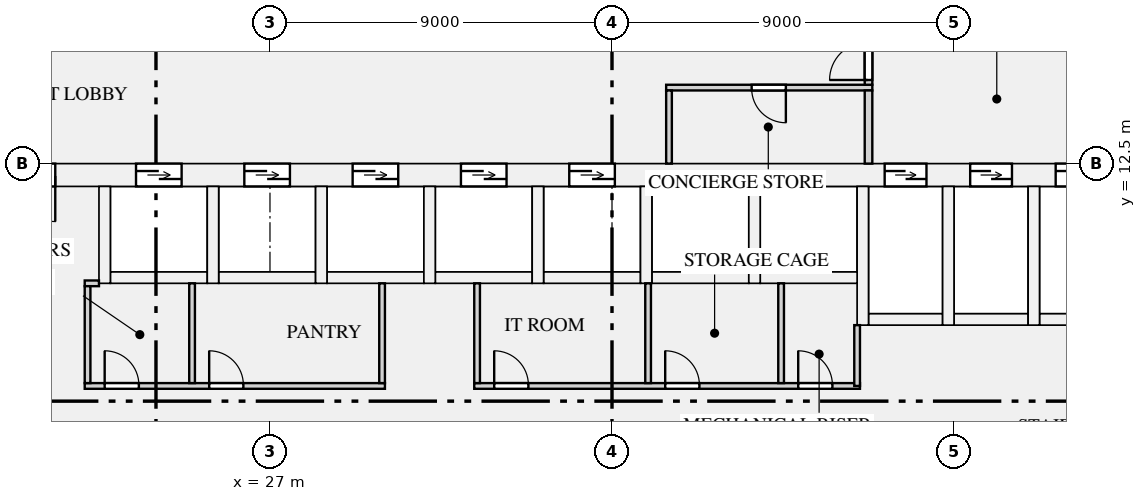
"""IFC4 building model, lengths in metres.
Left out: names, types, materials, properties, quantities, classifications, styles, units other than length and angle.
Written with IfcOpenShell. Run it as: python <this file> out.ifc"""

import sys

from ifc_helpers import new_model, si_unit, direction, frame, frame_2d, origin, place, context, subcontext, project, spatial, rectangle, extrude, element, fill, save


model = new_model("IFC4")
c1 = context("Model", 3, precision=1e-05, world=origin(), true_north=direction((0.0, 1.0)))
c2 = subcontext(c1, "Body", "Model", "MODEL_VIEW")
j1 = project(units=[si_unit("LENGTHUNIT", "METRE"), si_unit("PLANEANGLEUNIT", "RADIAN")], contexts=[c1])
p1 = place(None, origin())
s1 = spatial("IfcSite", under=j1, at=p1, CompositionType="ELEMENT")
p2 = place(p1, origin())
s2 = spatial("IfcBuilding", under=s1, at=p2, CompositionType="ELEMENT")
p3 = place(p2, frame((0.0, 0.0, 11.0)))
s3 = spatial("IfcBuildingStorey", under=s2, at=p3, CompositionType="ELEMENT", Elevation=11.0)
p4 = place(p3, frame((19.0, 12.2, 0.0), z_axis=(0.0, 0.0, 1.0), x_axis=(1.0, 0.0, 0.0)))
e1 = element("IfcWall", 1, at=p4, inside=s3, PredefinedType="SHEAR", context=c2, shape_type="SweptSolid", body=[
    extrude(rectangle(XDim=34.0, YDim=0.6, at=frame_2d((17.0, 0.0))), origin(), (0.0, 0.0, 1.0), 4.5),
])
p5 = place(p4, frame((4.475, 0.0, 0.0)))
e2 = element("IfcOpeningElement", 2, at=p5, cuts=e1, PredefinedType="OPENING", context=c2, shape_type="SweptSolid", body=[
    extrude(rectangle(XDim=1.2, YDim=2.1, at=frame_2d((0.6, 1.05))), frame((0.0, 0.31, 0.0), z_axis=(0.0, -1.0, 0.0), x_axis=(1.0, 0.0, 0.0)), (0.0, 0.0, 1.0), 0.62),
])
p6 = place(p4, frame((7.325, 0.0, 0.0)))
e3 = element("IfcOpeningElement", 3, at=p6, cuts=e1, PredefinedType="OPENING", context=c2, shape_type="SweptSolid", body=[
    extrude(rectangle(XDim=1.2, YDim=2.1, at=frame_2d((0.6, 1.05))), frame((0.0, 0.31, 0.0), z_axis=(0.0, -1.0, 0.0), x_axis=(1.0, 0.0, 0.0)), (0.0, 0.0, 1.0), 0.62),
])
p7 = place(p4, frame((10.175, 0.0, 0.0)))
e4 = element("IfcOpeningElement", 4, at=p7, cuts=e1, PredefinedType="OPENING", context=c2, shape_type="SweptSolid", body=[
    extrude(rectangle(XDim=1.2, YDim=2.1, at=frame_2d((0.6, 1.05))), frame((0.0, 0.31, 0.0), z_axis=(0.0, -1.0, 0.0), x_axis=(1.0, 0.0, 0.0)), (0.0, 0.0, 1.0), 0.62),
])
p8 = place(p4, frame((13.025, 0.0, 0.0)))
e5 = element("IfcOpeningElement", 5, at=p8, cuts=e1, PredefinedType="OPENING", context=c2, shape_type="SweptSolid", body=[
    extrude(rectangle(XDim=1.2, YDim=2.1, at=frame_2d((0.6, 1.05))), frame((0.0, 0.31, 0.0), z_axis=(0.0, -1.0, 0.0), x_axis=(1.0, 0.0, 0.0)), (0.0, 0.0, 1.0), 0.62),
])
p9 = place(p4, frame((15.875, 0.0, 0.0)))
e6 = element("IfcOpeningElement", 6, at=p9, cuts=e1, PredefinedType="OPENING", context=c2, shape_type="SweptSolid", body=[
    extrude(rectangle(XDim=1.2, YDim=2.1, at=frame_2d((0.6, 1.05))), frame((0.0, 0.31, 0.0), z_axis=(0.0, -1.0, 0.0), x_axis=(1.0, 0.0, 0.0)), (0.0, 0.0, 1.0), 0.62),
])
p10 = place(p4, frame((24.175, 0.0, 0.0)))
e7 = element("IfcOpeningElement", 7, at=p10, cuts=e1, PredefinedType="OPENING", context=c2, shape_type="SweptSolid", body=[
    extrude(rectangle(XDim=1.1, YDim=2.1, at=frame_2d((0.55, 1.05))), frame((0.0, 0.31, 0.0), z_axis=(0.0, -1.0, 0.0), x_axis=(1.0, 0.0, 0.0)), (0.0, 0.0, 1.0), 0.62),
])
p11 = place(p4, frame((26.425, 0.0, 0.0)))
e8 = element("IfcOpeningElement", 8, at=p11, cuts=e1, PredefinedType="OPENING", context=c2, shape_type="SweptSolid", body=[
    extrude(rectangle(XDim=1.1, YDim=2.1, at=frame_2d((0.55, 1.05))), frame((0.0, 0.31, 0.0), z_axis=(0.0, -1.0, 0.0), x_axis=(1.0, 0.0, 0.0)), (0.0, 0.0, 1.0), 0.62),
])
p12 = place(p4, frame((28.675, 0.0, 0.0)))
e9 = element("IfcOpeningElement", 9, at=p12, cuts=e1, PredefinedType="OPENING", context=c2, shape_type="SweptSolid", body=[
    extrude(rectangle(XDim=1.1, YDim=2.1, at=frame_2d((0.55, 1.05))), frame((0.0, 0.31, 0.0), z_axis=(0.0, -1.0, 0.0), x_axis=(1.0, 0.0, 0.0)), (0.0, 0.0, 1.0), 0.62),
])
p13 = place(p4, frame((1.15, 0.0, 0.0)))
e10 = element("IfcOpeningElement", 10, at=p13, cuts=e1, PredefinedType="OPENING", context=c2, shape_type="SweptSolid", body=[
    extrude(rectangle(XDim=1.2, YDim=2.1, at=frame_2d((0.6, 1.05))), frame((0.0, 0.31, 0.0), z_axis=(0.0, -1.0, 0.0), x_axis=(1.0, 0.0, 0.0)), (0.0, 0.0, 1.0), 0.62),
])
p14 = place(p4, frame((31.65, 0.0, 0.0)))
e11 = element("IfcOpeningElement", 11, at=p14, cuts=e1, PredefinedType="OPENING", context=c2, shape_type="SweptSolid", body=[
    extrude(rectangle(XDim=1.2, YDim=2.1, at=frame_2d((0.6, 1.05))), frame((0.0, 0.31, 0.0), z_axis=(0.0, -1.0, 0.0), x_axis=(1.0, 0.0, 0.0)), (0.0, 0.0, 1.0), 0.62),
])
p15 = place(p3, frame((22.8, 9.5, 0.0), z_axis=(0.0, 0.0, 1.0), x_axis=(1.0, 0.0, 0.0)))
e12 = element("IfcWall", 12, at=p15, inside=s3, PredefinedType="SHEAR", context=c2, shape_type="SweptSolid", body=[
    extrude(rectangle(XDim=2.55, YDim=0.3, at=frame_2d((1.275, 0.0))), origin(), (0.0, 0.0, 1.0), 4.5),
])
p16 = place(p3, frame((22.65, 9.35, 0.0), z_axis=(0.0, 0.0, 1.0), x_axis=(0.0, 1.0, 0.0)))
e13 = element("IfcWall", 13, at=p16, inside=s3, PredefinedType="SHEAR", context=c2, shape_type="SweptSolid", body=[
    extrude(rectangle(XDim=2.55, YDim=0.3, at=frame_2d((1.275, 0.0))), origin(), (0.0, 0.0, 1.0), 4.5),
])
p17 = place(p3, frame((25.65, 9.5, 0.0), z_axis=(0.0, 0.0, 1.0), x_axis=(1.0, 0.0, 0.0)))
e14 = element("IfcWall", 14, at=p17, inside=s3, PredefinedType="SHEAR", context=c2, shape_type="SweptSolid", body=[
    extrude(rectangle(XDim=2.55, YDim=0.3, at=frame_2d((1.275, 0.0))), origin(), (0.0, 0.0, 1.0), 4.5),
])
p18 = place(p3, frame((25.5, 9.35, 0.0), z_axis=(0.0, 0.0, 1.0), x_axis=(0.0, 1.0, 0.0)))
e15 = element("IfcWall", 15, at=p18, inside=s3, PredefinedType="SHEAR", context=c2, shape_type="SweptSolid", body=[
    extrude(rectangle(XDim=2.55, YDim=0.3, at=frame_2d((1.275, 0.0))), origin(), (0.0, 0.0, 1.0), 4.5),
])
p19 = place(p3, frame((28.5, 9.5, 0.0), z_axis=(0.0, 0.0, 1.0), x_axis=(1.0, 0.0, 0.0)))
e16 = element("IfcWall", 16, at=p19, inside=s3, PredefinedType="SHEAR", context=c2, shape_type="SweptSolid", body=[
    extrude(rectangle(XDim=2.55, YDim=0.3, at=frame_2d((1.275, 0.0))), origin(), (0.0, 0.0, 1.0), 4.5),
])
for number, where, z_axis, x_axis in (
    (17, (28.35, 9.35, 0.0), (0.0, 0.0, 1.0), (0.0, 1.0, 0.0)),
    (18, (31.35, 9.5, 0.0), (0.0, 0.0, 1.0), (1.0, 0.0, 0.0)),
    (19, (31.2, 9.35, 0.0), (0.0, 0.0, 1.0), (0.0, 1.0, 0.0)),
):
    element("IfcWall", number, at=place(p3, frame(where, z_axis=z_axis, x_axis=x_axis)), inside=s3, PredefinedType="SHEAR", context=c2, shape_type="SweptSolid", body=[
        extrude(rectangle(XDim=2.55, YDim=0.3, at=frame_2d((1.275, 0.0))), origin(), (0.0, 0.0, 1.0), 4.5),
    ])
p20 = place(p3, frame((34.2, 9.5, 0.0), z_axis=(0.0, 0.0, 1.0), x_axis=(1.0, 0.0, 0.0)))
e20 = element("IfcWall", 20, at=p20, inside=s3, PredefinedType="SHEAR", context=c2, shape_type="SweptSolid", body=[
    extrude(rectangle(XDim=2.55, YDim=0.3, at=frame_2d((1.275, 0.0))), origin(), (0.0, 0.0, 1.0), 4.5),
])
p21 = place(p3, frame((34.05, 9.35, 0.0), z_axis=(0.0, 0.0, 1.0), x_axis=(0.0, 1.0, 0.0)))
e21 = element("IfcWall", 21, at=p21, inside=s3, PredefinedType="SHEAR", context=c2, shape_type="SweptSolid", body=[
    extrude(rectangle(XDim=2.55, YDim=0.3, at=frame_2d((1.275, 0.0))), origin(), (0.0, 0.0, 1.0), 4.5),
])
p22 = place(p3, frame((37.05, 9.5, 0.0), z_axis=(0.0, 0.0, 1.0), x_axis=(1.0, 0.0, 0.0)))
e22 = element("IfcWall", 22, at=p22, inside=s3, PredefinedType="SHEAR", context=c2, shape_type="SweptSolid", body=[
    extrude(rectangle(XDim=2.55, YDim=0.3, at=frame_2d((1.275, 0.0))), origin(), (0.0, 0.0, 1.0), 4.5),
])
p23 = place(p3, frame((36.9, 9.35, 0.0), z_axis=(0.0, 0.0, 1.0), x_axis=(0.0, 1.0, 0.0)))
e23 = element("IfcWall", 23, at=p23, inside=s3, PredefinedType="SHEAR", context=c2, shape_type="SweptSolid", body=[
    extrude(rectangle(XDim=2.55, YDim=0.3, at=frame_2d((1.275, 0.0))), origin(), (0.0, 0.0, 1.0), 4.5),
])
p24 = place(p3, frame((39.9, 9.5, 0.0), z_axis=(0.0, 0.0, 1.0), x_axis=(1.0, 0.0, 0.0)))
e24 = element("IfcWall", 24, at=p24, inside=s3, PredefinedType="SHEAR", context=c2, shape_type="SweptSolid", body=[
    extrude(rectangle(XDim=2.55, YDim=0.3, at=frame_2d((1.275, 0.0))), origin(), (0.0, 0.0, 1.0), 4.5),
])
p25 = place(p3, frame((39.75, 9.35, 0.0), z_axis=(0.0, 0.0, 1.0), x_axis=(0.0, 1.0, 0.0)))
e25 = element("IfcWall", 25, at=p25, inside=s3, PredefinedType="SHEAR", context=c2, shape_type="SweptSolid", body=[
    extrude(rectangle(XDim=2.55, YDim=0.3, at=frame_2d((1.275, 0.0))), origin(), (0.0, 0.0, 1.0), 4.5),
])
p26 = place(p3, frame((42.75, 8.4, 0.0), z_axis=(0.0, 0.0, 1.0), x_axis=(1.0, 0.0, 0.0)))
e26 = element("IfcWall", 26, at=p26, inside=s3, PredefinedType="SHEAR", context=c2, shape_type="SweptSolid", body=[
    extrude(rectangle(XDim=1.95, YDim=0.3, at=frame_2d((0.975, 0.0))), origin(), (0.0, 0.0, 1.0), 4.5),
])
p27 = place(p3, frame((42.6, 8.25, 0.0), z_axis=(0.0, 0.0, 1.0), x_axis=(0.0, 1.0, 0.0)))
e27 = element("IfcWall", 27, at=p27, inside=s3, PredefinedType="SHEAR", context=c2, shape_type="SweptSolid", body=[
    extrude(rectangle(XDim=3.65, YDim=0.3, at=frame_2d((1.825, 0.0))), origin(), (0.0, 0.0, 1.0), 4.5),
])
p28 = place(p3, frame((45.0, 8.4, 0.0), z_axis=(0.0, 0.0, 1.0), x_axis=(1.0, 0.0, 0.0)))
e28 = element("IfcWall", 28, at=p28, inside=s3, PredefinedType="SHEAR", context=c2, shape_type="SweptSolid", body=[
    extrude(rectangle(XDim=1.95, YDim=0.3, at=frame_2d((0.975, 0.0))), origin(), (0.0, 0.0, 1.0), 4.5),
])
p29 = place(p3, frame((44.85, 8.25, 0.0), z_axis=(0.0, 0.0, 1.0), x_axis=(0.0, 1.0, 0.0)))
e29 = element("IfcWall", 29, at=p29, inside=s3, PredefinedType="SHEAR", context=c2, shape_type="SweptSolid", body=[
    extrude(rectangle(XDim=3.65, YDim=0.3, at=frame_2d((1.825, 0.0))), origin(), (0.0, 0.0, 1.0), 4.5),
])
p30 = place(p3, frame((47.25, 8.4, 0.0), z_axis=(0.0, 0.0, 1.0), x_axis=(1.0, 0.0, 0.0)))
e30 = element("IfcWall", 30, at=p30, inside=s3, PredefinedType="SHEAR", context=c2, shape_type="SweptSolid", body=[
    extrude(rectangle(XDim=1.95, YDim=0.3, at=frame_2d((0.975, 0.0))), origin(), (0.0, 0.0, 1.0), 4.5),
])
p31 = place(p3, frame((47.1, 8.25, 0.0), z_axis=(0.0, 0.0, 1.0), x_axis=(0.0, 1.0, 0.0)))
e31 = element("IfcWall", 31, at=p31, inside=s3, PredefinedType="SHEAR", context=c2, shape_type="SweptSolid", body=[
    extrude(rectangle(XDim=3.65, YDim=0.3, at=frame_2d((1.825, 0.0))), origin(), (0.0, 0.0, 1.0), 4.5),
])
p32 = place(p3, frame((22.125, 6.65, 0.0), z_axis=(0.0, 0.0, 1.0), x_axis=(1.0, 0.0, 0.0)))
e32 = element("IfcWall", 32, at=p32, inside=s3, PredefinedType="PARTITIONING", context=c2, shape_type="SweptSolid", body=[
    extrude(rectangle(XDim=7.9, YDim=0.15, at=frame_2d((3.95, 0.0))), origin(), (0.0, 0.0, 1.0), 3.9),
])
p33 = place(p32, frame((0.525, 0.0, 0.0)))
e33 = element("IfcOpeningElement", 33, at=p33, cuts=e32, PredefinedType="OPENING", context=c2, shape_type="SweptSolid", body=[
    extrude(rectangle(XDim=0.9, YDim=2.1, at=frame_2d((0.45, 1.05))), frame((0.0, 0.085, 0.0), z_axis=(0.0, -1.0, 0.0), x_axis=(1.0, 0.0, 0.0)), (0.0, 0.0, 1.0), 0.17),
])
p34 = place(p32, frame((3.275, 0.0, 0.0)))
e34 = element("IfcOpeningElement", 34, at=p34, cuts=e32, PredefinedType="OPENING", context=c2, shape_type="SweptSolid", body=[
    extrude(rectangle(XDim=0.9, YDim=2.1, at=frame_2d((0.45, 1.05))), frame((0.0, 0.085, 0.0), z_axis=(0.0, -1.0, 0.0), x_axis=(1.0, 0.0, 0.0)), (0.0, 0.0, 1.0), 0.17),
])
p35 = place(p3, frame((32.375, 6.65, 0.0), z_axis=(0.0, 0.0, 1.0), x_axis=(1.0, 0.0, 0.0)))
e35 = element("IfcWall", 35, at=p35, inside=s3, PredefinedType="PARTITIONING", context=c2, shape_type="SweptSolid", body=[
    extrude(rectangle(XDim=10.15, YDim=0.15, at=frame_2d((5.075, 0.0))), origin(), (0.0, 0.0, 1.0), 3.9),
])
p36 = place(p35, frame((0.525, 0.0, 0.0)))
e36 = element("IfcOpeningElement", 36, at=p36, cuts=e35, PredefinedType="OPENING", context=c2, shape_type="SweptSolid", body=[
    extrude(rectangle(XDim=0.9, YDim=2.1, at=frame_2d((0.45, 1.05))), frame((0.0, 0.085, 0.0), z_axis=(0.0, -1.0, 0.0), x_axis=(1.0, 0.0, 0.0)), (0.0, 0.0, 1.0), 0.17),
])
p37 = place(p35, frame((5.025, 0.0, 0.0)))
e37 = element("IfcOpeningElement", 37, at=p37, cuts=e35, PredefinedType="OPENING", context=c2, shape_type="SweptSolid", body=[
    extrude(rectangle(XDim=0.9, YDim=2.1, at=frame_2d((0.45, 1.05))), frame((0.0, 0.085, 0.0), z_axis=(0.0, -1.0, 0.0), x_axis=(1.0, 0.0, 0.0)), (0.0, 0.0, 1.0), 0.17),
])
p38 = place(p35, frame((8.525, 0.0, 0.0)))
e38 = element("IfcOpeningElement", 38, at=p38, cuts=e35, PredefinedType="OPENING", context=c2, shape_type="SweptSolid", body=[
    extrude(rectangle(XDim=0.9, YDim=2.1, at=frame_2d((0.45, 1.05))), frame((0.0, 0.085, 0.0), z_axis=(0.0, -1.0, 0.0), x_axis=(1.0, 0.0, 0.0)), (0.0, 0.0, 1.0), 0.17),
])
p39 = place(p3, frame((22.125, 9.35, 0.0), z_axis=(0.0, 0.0, 1.0), x_axis=(1.0, 0.0, 0.0)))
e39 = element("IfcWall", 39, at=p39, inside=s3, PredefinedType="PARTITIONING", context=c2, shape_type="SweptSolid", body=[
    extrude(rectangle(XDim=0.375, YDim=0.15, at=frame_2d((0.188, 0.0))), origin(), (0.0, 0.0, 1.0), 3.9),
])
p40 = place(p3, frame((37.425, 14.5, 0.0), z_axis=(0.0, 0.0, 1.0), x_axis=(1.0, 0.0, 0.0)))
e40 = element("IfcWall", 40, at=p40, inside=s3, PredefinedType="PARTITIONING", context=c2, shape_type="SweptSolid", body=[
    extrude(rectangle(XDim=5.425, YDim=0.15, at=frame_2d((2.712, 0.0))), origin(), (0.0, 0.0, 1.0), 3.9),
])
p41 = place(p40, frame((2.25, 0.0, 0.0)))
e41 = element("IfcOpeningElement", 41, at=p41, cuts=e40, PredefinedType="OPENING", context=c2, shape_type="SweptSolid", body=[
    extrude(rectangle(XDim=0.9, YDim=2.1, at=frame_2d((0.45, 1.05))), frame((0.0, 0.085, 0.0), z_axis=(0.0, -1.0, 0.0), x_axis=(1.0, 0.0, 0.0)), (0.0, 0.0, 1.0), 0.17),
])
p42 = place(p3, frame((42.45, 6.65, 0.0), z_axis=(0.0, 0.0, 1.0), x_axis=(0.0, 1.0, 0.0)))
e42 = element("IfcWall", 42, at=p42, inside=s3, PredefinedType="PARTITIONING", context=c2, shape_type="SweptSolid", body=[
    extrude(rectangle(XDim=1.6, YDim=0.15, at=frame_2d((0.8, 0.0))), origin(), (0.0, 0.0, 1.0), 3.9),
])
p43 = place(p3, frame((22.2, 6.725, 0.0), z_axis=(0.0, 0.0, 1.0), x_axis=(0.0, 1.0, 0.0)))
e43 = element("IfcWall", 43, at=p43, inside=s3, PredefinedType="PARTITIONING", context=c2, shape_type="SweptSolid", body=[
    extrude(rectangle(XDim=2.55, YDim=0.15, at=frame_2d((1.275, 0.0))), origin(), (0.0, 0.0, 1.0), 3.9),
])
for number, where, z_axis, x_axis in (
    (44, (24.95, 6.725, 0.0), (0.0, 0.0, 1.0), (0.0, 1.0, 0.0)),
    (45, (29.95, 6.725, 0.0), (0.0, 0.0, 1.0), (0.0, 1.0, 0.0)),
    (46, (32.45, 6.725, 0.0), (0.0, 0.0, 1.0), (0.0, 1.0, 0.0)),
    (47, (36.95, 6.725, 0.0), (0.0, 0.0, 1.0), (0.0, 1.0, 0.0)),
    (48, (40.45, 6.725, 0.0), (0.0, 0.0, 1.0), (0.0, 1.0, 0.0)),
):
    element("IfcWall", number, at=place(p3, frame(where, z_axis=z_axis, x_axis=x_axis)), inside=s3, PredefinedType="PARTITIONING", context=c2, shape_type="SweptSolid", body=[
        extrude(rectangle(XDim=2.625, YDim=0.15, at=frame_2d((1.312, 0.0))), origin(), (0.0, 0.0, 1.0), 3.9),
    ])
p44 = place(p3, frame((37.5, 12.5, 0.0), z_axis=(0.0, 0.0, 1.0), x_axis=(0.0, 1.0, 0.0)))
e49 = element("IfcWall", 49, at=p44, inside=s3, PredefinedType="PARTITIONING", context=c2, shape_type="SweptSolid", body=[
    extrude(rectangle(XDim=1.925, YDim=0.15, at=frame_2d((0.962, 0.0))), origin(), (0.0, 0.0, 1.0), 3.9),
])
p45 = place(p3, frame((42.75, 12.5, 0.0), z_axis=(0.0, 0.0, 1.0), x_axis=(0.0, 1.0, 0.0)))
e50 = element("IfcWall", 50, at=p45, inside=s3, PredefinedType="PARTITIONING", context=c2, shape_type="SweptSolid", body=[
    extrude(rectangle(XDim=1.925, YDim=0.2, at=frame_2d((0.962, 0.0))), origin(), (0.0, 0.0, 1.0), 3.9),
])
p46 = place(p3, frame((42.75, 14.575, 0.0), z_axis=(0.0, 0.0, 1.0), x_axis=(0.0, 1.0, 0.0)))
e51 = element("IfcWall", 51, at=p46, inside=s3, PredefinedType="PARTITIONING", context=c2, shape_type="SweptSolid", body=[
    extrude(rectangle(XDim=1.325, YDim=0.2, at=frame_2d((0.663, 0.0))), origin(), (0.0, 0.0, 1.0), 3.9),
])
p47 = place(p46, frame((0.125, 0.0, 0.0)))
e52 = element("IfcOpeningElement", 52, at=p47, cuts=e51, PredefinedType="OPENING", context=c2, shape_type="SweptSolid", body=[
    extrude(rectangle(XDim=1.0, YDim=2.1, at=frame_2d((0.5, 1.05))), frame((0.0, 0.11, 0.0), z_axis=(0.0, -1.0, 0.0), x_axis=(1.0, 0.0, 0.0)), (0.0, 0.0, 1.0), 0.22),
])
p48 = place(p5, origin())
e53 = element("IfcDoor", 53, at=p48, inside=s3, OperationType="DOUBLE_DOOR_SLIDING", PredefinedType="DOOR", context=c2, shape_type="SweptSolid", body=[
    extrude(rectangle(XDim=1.2, YDim=2.1, at=frame_2d((0.6, 1.05))), frame((0.0, 0.025, 0.0), z_axis=(0.0, -1.0, 0.0), x_axis=(1.0, 0.0, 0.0)), (0.0, 0.0, 1.0), 0.05),
])
fill(e2, e53)
p49 = place(p6, origin())
e54 = element("IfcDoor", 54, at=p49, inside=s3, OperationType="DOUBLE_DOOR_SLIDING", PredefinedType="DOOR", context=c2, shape_type="SweptSolid", body=[
    extrude(rectangle(XDim=1.2, YDim=2.1, at=frame_2d((0.6, 1.05))), frame((0.0, 0.025, 0.0), z_axis=(0.0, -1.0, 0.0), x_axis=(1.0, 0.0, 0.0)), (0.0, 0.0, 1.0), 0.05),
])
fill(e3, e54)
p50 = place(p7, origin())
e55 = element("IfcDoor", 55, at=p50, inside=s3, OperationType="DOUBLE_DOOR_SLIDING", PredefinedType="DOOR", context=c2, shape_type="SweptSolid", body=[
    extrude(rectangle(XDim=1.2, YDim=2.1, at=frame_2d((0.6, 1.05))), frame((0.0, 0.025, 0.0), z_axis=(0.0, -1.0, 0.0), x_axis=(1.0, 0.0, 0.0)), (0.0, 0.0, 1.0), 0.05),
])
fill(e4, e55)
p51 = place(p8, origin())
e56 = element("IfcDoor", 56, at=p51, inside=s3, OperationType="DOUBLE_DOOR_SLIDING", PredefinedType="DOOR", context=c2, shape_type="SweptSolid", body=[
    extrude(rectangle(XDim=1.2, YDim=2.1, at=frame_2d((0.6, 1.05))), frame((0.0, 0.025, 0.0), z_axis=(0.0, -1.0, 0.0), x_axis=(1.0, 0.0, 0.0)), (0.0, 0.0, 1.0), 0.05),
])
fill(e5, e56)
p52 = place(p9, origin())
e57 = element("IfcDoor", 57, at=p52, inside=s3, OperationType="DOUBLE_DOOR_SLIDING", PredefinedType="DOOR", context=c2, shape_type="SweptSolid", body=[
    extrude(rectangle(XDim=1.2, YDim=2.1, at=frame_2d((0.6, 1.05))), frame((0.0, 0.025, 0.0), z_axis=(0.0, -1.0, 0.0), x_axis=(1.0, 0.0, 0.0)), (0.0, 0.0, 1.0), 0.05),
])
fill(e6, e57)
p53 = place(p10, origin())
e58 = element("IfcDoor", 58, at=p53, inside=s3, OperationType="DOUBLE_DOOR_SLIDING", PredefinedType="DOOR", context=c2, shape_type="SweptSolid", body=[
    extrude(rectangle(XDim=1.1, YDim=2.1, at=frame_2d((0.55, 1.05))), frame((0.0, 0.025, 0.0), z_axis=(0.0, -1.0, 0.0), x_axis=(1.0, 0.0, 0.0)), (0.0, 0.0, 1.0), 0.05),
])
fill(e7, e58)
p54 = place(p11, origin())
e59 = element("IfcDoor", 59, at=p54, inside=s3, OperationType="DOUBLE_DOOR_SLIDING", PredefinedType="DOOR", context=c2, shape_type="SweptSolid", body=[
    extrude(rectangle(XDim=1.1, YDim=2.1, at=frame_2d((0.55, 1.05))), frame((0.0, 0.025, 0.0), z_axis=(0.0, -1.0, 0.0), x_axis=(1.0, 0.0, 0.0)), (0.0, 0.0, 1.0), 0.05),
])
fill(e8, e59)
p55 = place(p12, origin())
e60 = element("IfcDoor", 60, at=p55, inside=s3, OperationType="DOUBLE_DOOR_SLIDING", PredefinedType="DOOR", context=c2, shape_type="SweptSolid", body=[
    extrude(rectangle(XDim=1.1, YDim=2.1, at=frame_2d((0.55, 1.05))), frame((0.0, 0.025, 0.0), z_axis=(0.0, -1.0, 0.0), x_axis=(1.0, 0.0, 0.0)), (0.0, 0.0, 1.0), 0.05),
])
fill(e9, e60)
p56 = place(p33, origin())
e61 = element("IfcDoor", 61, at=p56, inside=s3, OperationType="SINGLE_SWING_LEFT", PredefinedType="DOOR", context=c2, shape_type="SweptSolid", body=[
    extrude(rectangle(XDim=0.9, YDim=2.1, at=frame_2d((0.45, 1.05))), frame((0.0, 0.025, 0.0), z_axis=(0.0, -1.0, 0.0), x_axis=(1.0, 0.0, 0.0)), (0.0, 0.0, 1.0), 0.05),
])
fill(e33, e61)
p57 = place(p34, origin())
e62 = element("IfcDoor", 62, at=p57, inside=s3, OperationType="SINGLE_SWING_LEFT", PredefinedType="DOOR", context=c2, shape_type="SweptSolid", body=[
    extrude(rectangle(XDim=0.9, YDim=2.1, at=frame_2d((0.45, 1.05))), frame((0.0, 0.025, 0.0), z_axis=(0.0, -1.0, 0.0), x_axis=(1.0, 0.0, 0.0)), (0.0, 0.0, 1.0), 0.05),
])
fill(e34, e62)
p58 = place(p36, origin())
e63 = element("IfcDoor", 63, at=p58, inside=s3, OperationType="SINGLE_SWING_LEFT", PredefinedType="DOOR", context=c2, shape_type="SweptSolid", body=[
    extrude(rectangle(XDim=0.9, YDim=2.1, at=frame_2d((0.45, 1.05))), frame((0.0, 0.025, 0.0), z_axis=(0.0, -1.0, 0.0), x_axis=(1.0, 0.0, 0.0)), (0.0, 0.0, 1.0), 0.05),
])
fill(e36, e63)
p59 = place(p37, origin())
e64 = element("IfcDoor", 64, at=p59, inside=s3, OperationType="SINGLE_SWING_LEFT", PredefinedType="DOOR", context=c2, shape_type="SweptSolid", body=[
    extrude(rectangle(XDim=0.9, YDim=2.1, at=frame_2d((0.45, 1.05))), frame((0.0, 0.025, 0.0), z_axis=(0.0, -1.0, 0.0), x_axis=(1.0, 0.0, 0.0)), (0.0, 0.0, 1.0), 0.05),
])
fill(e37, e64)
p60 = place(p38, origin())
e65 = element("IfcDoor", 65, at=p60, inside=s3, OperationType="SINGLE_SWING_LEFT", PredefinedType="DOOR", context=c2, shape_type="SweptSolid", body=[
    extrude(rectangle(XDim=0.9, YDim=2.1, at=frame_2d((0.45, 1.05))), frame((0.0, 0.025, 0.0), z_axis=(0.0, -1.0, 0.0), x_axis=(1.0, 0.0, 0.0)), (0.0, 0.0, 1.0), 0.05),
])
fill(e38, e65)
p61 = place(p41, frame((0.9, 0.0, 0.0), z_axis=(0.0, 0.0, 1.0), x_axis=(-1.0, 0.0, 0.0)))
e66 = element("IfcDoor", 66, at=p61, inside=s3, OperationType="SINGLE_SWING_LEFT", PredefinedType="DOOR", context=c2, shape_type="SweptSolid", body=[
    extrude(rectangle(XDim=0.9, YDim=2.1, at=frame_2d((0.45, 1.05))), frame((0.0, 0.025, 0.0), z_axis=(0.0, -1.0, 0.0), x_axis=(1.0, 0.0, 0.0)), (0.0, 0.0, 1.0), 0.05),
])
fill(e41, e66)
p62 = place(p13, frame((1.2, 0.0, 0.0), z_axis=(0.0, 0.0, 1.0), x_axis=(-1.0, 0.0, 0.0)))
e67 = element("IfcDoor", 67, at=p62, inside=s3, OperationType="SINGLE_SWING_LEFT", PredefinedType="DOOR", context=c2, shape_type="SweptSolid", body=[
    extrude(rectangle(XDim=1.2, YDim=2.1, at=frame_2d((0.6, 1.05))), frame((0.0, 0.025, 0.0), z_axis=(0.0, -1.0, 0.0), x_axis=(1.0, 0.0, 0.0)), (0.0, 0.0, 1.0), 0.05),
])
fill(e10, e67)
p63 = place(p47, origin())
e68 = element("IfcDoor", 68, at=p63, inside=s3, OperationType="SINGLE_SWING_LEFT", PredefinedType="DOOR", context=c2, shape_type="SweptSolid", body=[
    extrude(rectangle(XDim=1.0, YDim=2.1, at=frame_2d((0.5, 1.05))), frame((0.0, 0.025, 0.0), z_axis=(0.0, -1.0, 0.0), x_axis=(1.0, 0.0, 0.0)), (0.0, 0.0, 1.0), 0.05),
])
fill(e52, e68)
save(model, sys.argv[1])
